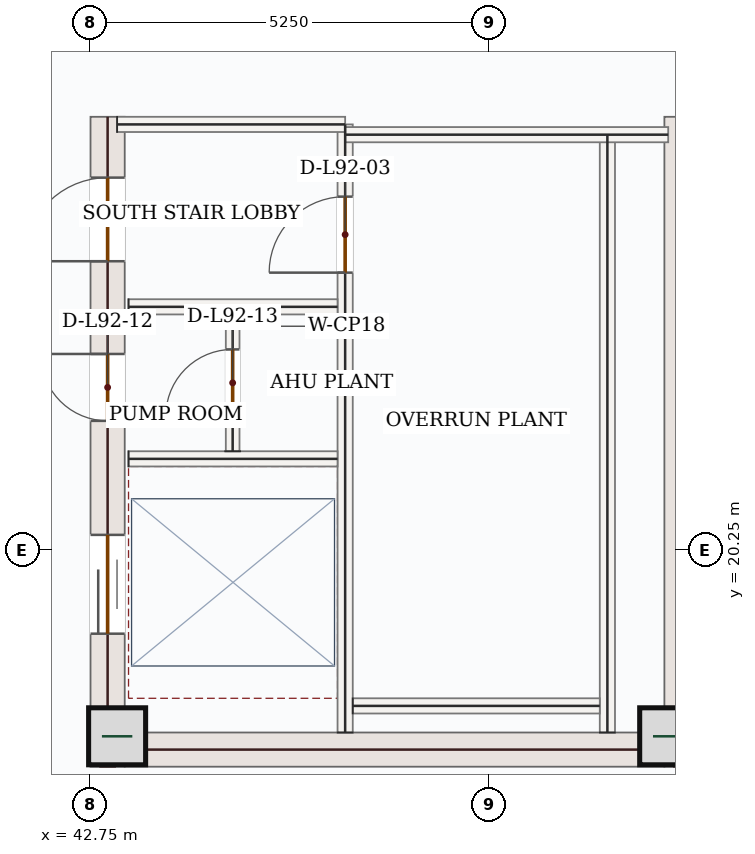
"""IFC4 building model, lengths in metres.
Left out: names, types, materials, properties, quantities, classifications, styles, units other than length and angle.
Written with IfcOpenShell. Run it as: python <this file> out.ifc"""

import sys

from ifc_helpers import new_model, si_unit, direction, frame, frame_2d, origin, origin_2d, place, context, subcontext, project, spatial, rectangle, extrude, source, transform, mapped, element, fill, save


model = new_model("IFC4")
c1 = context("Model", 3, precision=1e-05, world=origin(), true_north=direction((0.0, 1.0)))
c2 = subcontext(c1, "Body", "Model", "MODEL_VIEW")
j1 = project(units=[si_unit("LENGTHUNIT", "METRE"), si_unit("PLANEANGLEUNIT", "RADIAN")], contexts=[c1])
p1 = place(None, origin())
s1 = spatial("IfcSite", under=j1, at=p1, CompositionType="ELEMENT")
p2 = place(p1, origin())
s2 = spatial("IfcBuilding", under=s1, at=p2, CompositionType="ELEMENT")
p3 = place(p2, frame((0.0, 0.0, 379.65)))
s3 = spatial("IfcBuildingStorey", under=s2, at=p3, CompositionType="ELEMENT", Elevation=379.65)
p4 = place(p3, frame((42.975, 17.4, 0.0), z_axis=(0.0, 0.0, 1.0), x_axis=(0.0, 1.0, 0.0)))
e1 = element("IfcWall", 1, at=p4, inside=s3, PredefinedType="SHEAR", context=c2, shape_type="SweptSolid", body=[
    extrude(rectangle(XDim=8.55, YDim=0.45, at=frame_2d((4.275, 0.0))), origin(), (0.0, 0.0, 1.0), 3.95),
])
p5 = place(p4, frame((6.65, 0.0, 0.0)))
e2 = element("IfcOpeningElement", 2, at=p5, cuts=e1, PredefinedType="OPENING", context=c2, shape_type="SweptSolid", body=[
    extrude(rectangle(XDim=1.1, YDim=2.2, at=frame_2d((0.55, 1.1))), frame((0.0, 0.235, 0.0), z_axis=(0.0, -1.0, 0.0), x_axis=(1.0, 0.0, 0.0)), (0.0, 0.0, 1.0), 0.47),
])
p6 = place(p4, frame((1.75, 0.0, 0.0)))
e3 = element("IfcOpeningElement", 3, at=p6, cuts=e1, PredefinedType="OPENING", context=c2, shape_type="SweptSolid", body=[
    extrude(rectangle(XDim=1.3, YDim=2.2, at=frame_2d((0.65, 1.1))), frame((0.0, 0.235, 0.0), z_axis=(0.0, -1.0, 0.0), x_axis=(1.0, 0.0, 0.0)), (0.0, 0.0, 1.0), 0.47),
])
p7 = place(p4, frame((4.55, 0.0, 0.0)))
e4 = element("IfcOpeningElement", 4, at=p7, cuts=e1, PredefinedType="OPENING", context=c2, shape_type="SweptSolid", body=[
    extrude(rectangle(XDim=0.88, YDim=2.1, at=frame_2d((0.44, 1.05))), frame((0.0, 0.235, 0.0), z_axis=(0.0, -1.0, 0.0), x_axis=(1.0, 0.0, 0.0)), (0.0, 0.0, 1.0), 0.47),
])
m1 = source(origin(), c2, "Body", "SweptSolid", [
    extrude(rectangle(XDim=8.55, YDim=0.45, at=frame_2d((4.275, 0.0))), origin(), (0.0, 0.0, 1.0), 3.95),
])
p8 = place(p3, frame((50.525, 17.4, 0.0), z_axis=(0.0, 0.0, 1.0), x_axis=(0.0, 1.0, 0.0)))
e5 = element("IfcWall", 5, at=p8, inside=s3, PredefinedType="SHEAR", context=c2, shape_type="MappedRepresentation", body=[
    mapped(m1, transform((0.0, 0.0, 0.0), x_axis=(1.0, 0.0, 0.0), y_axis=(0.0, 1.0, 0.0), z_axis=(0.0, 0.0, 1.0), scale=1.0)),
])
m2 = source(origin(), c2, "Body", "SweptSolid", [
    extrude(rectangle(XDim=7.1, YDim=0.45, at=frame_2d((3.55, 0.0))), origin(), (0.0, 0.0, 1.0), 3.95),
])
p9 = place(p3, frame((43.2, 17.625, 0.0), z_axis=(0.0, 0.0, 1.0), x_axis=(1.0, 0.0, 0.0)))
e6 = element("IfcWall", 6, at=p9, inside=s3, PredefinedType="SHEAR", context=c2, shape_type="MappedRepresentation", body=[
    mapped(m2, transform((0.0, 0.0, 0.0), x_axis=(1.0, 0.0, 0.0), y_axis=(0.0, 1.0, 0.0), z_axis=(0.0, 0.0, 1.0), scale=1.0)),
])
m3 = source(origin(), c2, "Body", "SweptSolid", [
    extrude(rectangle(XDim=0.75, YDim=0.75, at=origin_2d()), origin(), (0.0, 0.0, 1.0), 4.2),
])
for number, where, z_axis, x_axis in (
    (7, (43.1, 17.8, 0.0), (0.0, 0.0, 1.0), (1.0, 0.0, 0.0)),
    (8, (50.35, 17.8, 0.0), (0.0, 0.0, 1.0), (1.0, 0.0, 0.0)),
):
    element("IfcColumn", number, at=place(p3, frame(where, z_axis=z_axis, x_axis=x_axis)), inside=s3, PredefinedType="COLUMN", context=c2, shape_type="MappedRepresentation", body=[
        mapped(m3, transform((0.0, 0.0, 0.0), x_axis=(1.0, 0.0, 0.0), y_axis=(0.0, 1.0, 0.0), z_axis=(0.0, 0.0, 1.0), scale=1.0)),
    ])
m4 = source(origin(), c2, "Body", "SweptSolid", [
    extrude(rectangle(XDim=5.258, YDim=0.26, at=frame_2d((2.629, 0.0))), origin(), (0.0, 0.0, 1.0), 3.95),
])
p10 = place(p3, frame((53.06, 18.458, 0.0), z_axis=(0.0, 0.0, 1.0), x_axis=(-0.707106781187, -0.707106781187, 0.0)))
e9 = element("IfcWall", 9, at=p10, inside=s3, PredefinedType="SOLIDWALL", context=c2, shape_type="MappedRepresentation", body=[
    mapped(m4, transform((0.0, 0.0, 0.0), x_axis=(1.0, 0.0, 0.0), y_axis=(0.0, 1.0, 0.0), z_axis=(0.0, 0.0, 1.0), scale=1.0)),
])
m5 = source(origin(), c2, "Body", "SweptSolid", [
    extrude(rectangle(XDim=7.87, YDim=0.2, at=frame_2d((3.935, 0.0))), origin(), (0.0, 0.0, 1.0), 3.95),
])
p11 = place(p3, frame((49.55, 17.85, 0.0), z_axis=(0.0, 0.0, 1.0), x_axis=(0.0, 1.0, 0.0)))
e10 = element("IfcWall", 10, at=p11, inside=s3, PredefinedType="SOLIDWALL", context=c2, shape_type="MappedRepresentation", body=[
    mapped(m5, transform((0.0, 0.0, 0.0), x_axis=(1.0, 0.0, 0.0), y_axis=(0.0, 1.0, 0.0), z_axis=(0.0, 0.0, 1.0), scale=1.0)),
])
p12 = place(p3, frame((46.1, 17.85, 0.0), z_axis=(0.0, 0.0, 1.0), x_axis=(0.0, 1.0, 0.0)))
e11 = element("IfcWall", 11, at=p12, inside=s3, PredefinedType="SOLIDWALL", context=c2, shape_type="SweptSolid", body=[
    extrude(rectangle(XDim=8.0, YDim=0.2, at=frame_2d((4.0, 0.0))), origin(), (0.0, 0.0, 1.0), 3.95),
])
p13 = place(p12, frame((6.05, 0.0, 0.0)))
e12 = element("IfcOpeningElement", 12, at=p13, cuts=e11, PredefinedType="OPENING", context=c2, shape_type="SweptSolid", body=[
    extrude(rectangle(XDim=1.0, YDim=2.15, at=frame_2d((0.5, 1.075))), frame((0.0, 0.11, 0.0), z_axis=(0.0, -1.0, 0.0), x_axis=(1.0, 0.0, 0.0)), (0.0, 0.0, 1.0), 0.22),
])
m6 = source(origin(), c2, "Body", "SweptSolid", [
    extrude(rectangle(XDim=3.0, YDim=0.2, at=frame_2d((1.5, 0.0))), origin(), (0.0, 0.0, 1.0), 3.95),
])
p14 = place(p3, frame((43.1, 25.85, 0.0), z_axis=(0.0, 0.0, 1.0), x_axis=(1.0, 0.0, 0.0)))
e13 = element("IfcWall", 13, at=p14, inside=s3, PredefinedType="SOLIDWALL", context=c2, shape_type="MappedRepresentation", body=[
    mapped(m6, transform((0.0, 0.0, 0.0), x_axis=(1.0, 0.0, 0.0), y_axis=(0.0, 1.0, 0.0), z_axis=(0.0, 0.0, 1.0), scale=1.0)),
])
m7 = source(origin(), c2, "Body", "SweptSolid", [
    extrude(rectangle(XDim=4.25, YDim=0.2, at=frame_2d((2.125, 0.0))), origin(), (0.0, 0.0, 1.0), 3.95),
])
p15 = place(p3, frame((46.1, 25.715, 0.0), z_axis=(0.0, 0.0, 1.0), x_axis=(1.0, 0.0, 0.0)))
e14 = element("IfcWall", 14, at=p15, inside=s3, PredefinedType="SOLIDWALL", context=c2, shape_type="MappedRepresentation", body=[
    mapped(m7, transform((0.0, 0.0, 0.0), x_axis=(1.0, 0.0, 0.0), y_axis=(0.0, 1.0, 0.0), z_axis=(0.0, 0.0, 1.0), scale=1.0)),
])
m8 = source(origin(), c2, "Body", "SweptSolid", [
    extrude(rectangle(XDim=3.25, YDim=0.2, at=frame_2d((1.625, 0.0))), origin(), (0.0, 0.0, 1.0), 3.95),
])
p16 = place(p3, frame((46.2, 18.2, 0.0), z_axis=(0.0, 0.0, 1.0), x_axis=(1.0, 0.0, 0.0)))
e15 = element("IfcWall", 15, at=p16, inside=s3, PredefinedType="SOLIDWALL", context=c2, shape_type="MappedRepresentation", body=[
    mapped(m8, transform((0.0, 0.0, 0.0), x_axis=(1.0, 0.0, 0.0), y_axis=(0.0, 1.0, 0.0), z_axis=(0.0, 0.0, 1.0), scale=1.0)),
])
m9 = source(origin(), c2, "Body", "SweptSolid", [
    extrude(rectangle(XDim=2.75, YDim=0.2, at=frame_2d((1.375, 0.0))), origin(), (0.0, 0.0, 1.0), 3.95),
])
for number, where, z_axis, x_axis in (
    (16, (43.25, 23.45, 0.0), (0.0, 0.0, 1.0), (1.0, 0.0, 0.0)),
    (17, (43.25, 21.45, 0.0), (0.0, 0.0, 1.0), (1.0, 0.0, 0.0)),
):
    element("IfcWall", number, at=place(p3, frame(where, z_axis=z_axis, x_axis=x_axis)), inside=s3, PredefinedType="SOLIDWALL", context=c2, shape_type="MappedRepresentation", body=[
        mapped(m9, transform((0.0, 0.0, 0.0), x_axis=(1.0, 0.0, 0.0), y_axis=(0.0, 1.0, 0.0), z_axis=(0.0, 0.0, 1.0), scale=1.0)),
    ])
p17 = place(p3, frame((44.62, 21.55, 0.0), z_axis=(0.0, 0.0, 1.0), x_axis=(0.0, 1.0, 0.0)))
e18 = element("IfcWall", 18, at=p17, inside=s3, PredefinedType="PARTITIONING", context=c2, shape_type="SweptSolid", body=[
    extrude(rectangle(XDim=1.8, YDim=0.18, at=frame_2d((0.9, 0.0))), origin(), (0.0, 0.0, 1.0), 3.95),
])
p18 = place(p17, frame((0.46, 0.0, 0.0)))
e19 = element("IfcOpeningElement", 19, at=p18, cuts=e18, PredefinedType="OPENING", context=c2, shape_type="SweptSolid", body=[
    extrude(rectangle(XDim=0.88, YDim=2.1, at=frame_2d((0.44, 1.05))), frame((0.0, 0.1, 0.0), z_axis=(0.0, -1.0, 0.0), x_axis=(1.0, 0.0, 0.0)), (0.0, 0.0, 1.0), 0.2),
])
m10 = source(origin(), c2, "Body", "SweptSolid", [
    extrude(rectangle(XDim=1.0, YDim=2.15, at=frame_2d((0.5, 1.075))), frame((0.0, 0.025, 0.0), z_axis=(0.0, -1.0, 0.0), x_axis=(1.0, 0.0, 0.0)), (0.0, 0.0, 1.0), 0.05),
])
p19 = place(p13, origin())
e20 = element("IfcDoor", 20, at=p19, inside=s3, OperationType="SINGLE_SWING_LEFT", PredefinedType="DOOR", context=c2, shape_type="MappedRepresentation", body=[
    mapped(m10, transform((0.0, 0.0, 0.0), x_axis=(1.0, 0.0, 0.0), y_axis=(0.0, 1.0, 0.0), z_axis=(0.0, 0.0, 1.0), scale=1.0)),
])
fill(e12, e20)
m11 = source(origin(), c2, "Body", "SweptSolid", [
    extrude(rectangle(XDim=1.1, YDim=2.2, at=frame_2d((0.55, 1.1))), frame((0.0, 0.025, 0.0), z_axis=(0.0, -1.0, 0.0), x_axis=(1.0, 0.0, 0.0)), (0.0, 0.0, 1.0), 0.05),
])
p20 = place(p5, origin())
e21 = element("IfcDoor", 21, at=p20, inside=s3, OperationType="SINGLE_SWING_LEFT", PredefinedType="DOOR", context=c2, shape_type="MappedRepresentation", body=[
    mapped(m11, transform((0.0, 0.0, 0.0), x_axis=(1.0, 0.0, 0.0), y_axis=(0.0, 1.0, 0.0), z_axis=(0.0, 0.0, 1.0), scale=1.0)),
])
fill(e2, e21)
m12 = source(origin(), c2, "Body", "SweptSolid", [
    extrude(rectangle(XDim=1.3, YDim=2.2, at=frame_2d((0.65, 1.1))), frame((0.0, 0.025, 0.0), z_axis=(0.0, -1.0, 0.0), x_axis=(1.0, 0.0, 0.0)), (0.0, 0.0, 1.0), 0.05),
])
p21 = place(p6, origin())
e22 = element("IfcDoor", 22, at=p21, inside=s3, OperationType="DOUBLE_DOOR_SLIDING", PredefinedType="DOOR", context=c2, shape_type="MappedRepresentation", body=[
    mapped(m12, transform((0.0, 0.0, 0.0), x_axis=(1.0, 0.0, 0.0), y_axis=(0.0, 1.0, 0.0), z_axis=(0.0, 0.0, 1.0), scale=1.0)),
])
fill(e3, e22)
m13 = source(origin(), c2, "Body", "SweptSolid", [
    extrude(rectangle(XDim=0.88, YDim=2.1, at=frame_2d((0.44, 1.05))), frame((0.0, 0.025, 0.0), z_axis=(0.0, -1.0, 0.0), x_axis=(1.0, 0.0, 0.0)), (0.0, 0.0, 1.0), 0.05),
])
p22 = place(p7, origin())
e23 = element("IfcDoor", 23, at=p22, inside=s3, OperationType="SINGLE_SWING_RIGHT", PredefinedType="DOOR", context=c2, shape_type="MappedRepresentation", body=[
    mapped(m13, transform((0.0, 0.0, 0.0), x_axis=(1.0, 0.0, 0.0), y_axis=(0.0, 1.0, 0.0), z_axis=(0.0, 0.0, 1.0), scale=1.0)),
])
fill(e4, e23)
p23 = place(p18, origin())
e24 = element("IfcDoor", 24, at=p23, inside=s3, OperationType="SINGLE_SWING_LEFT", PredefinedType="DOOR", context=c2, shape_type="MappedRepresentation", body=[
    mapped(m13, transform((0.0, 0.0, 0.0), x_axis=(1.0, 0.0, 0.0), y_axis=(0.0, 1.0, 0.0), z_axis=(0.0, 0.0, 1.0), scale=1.0)),
])
fill(e19, e24)
save(model, sys.argv[1])
